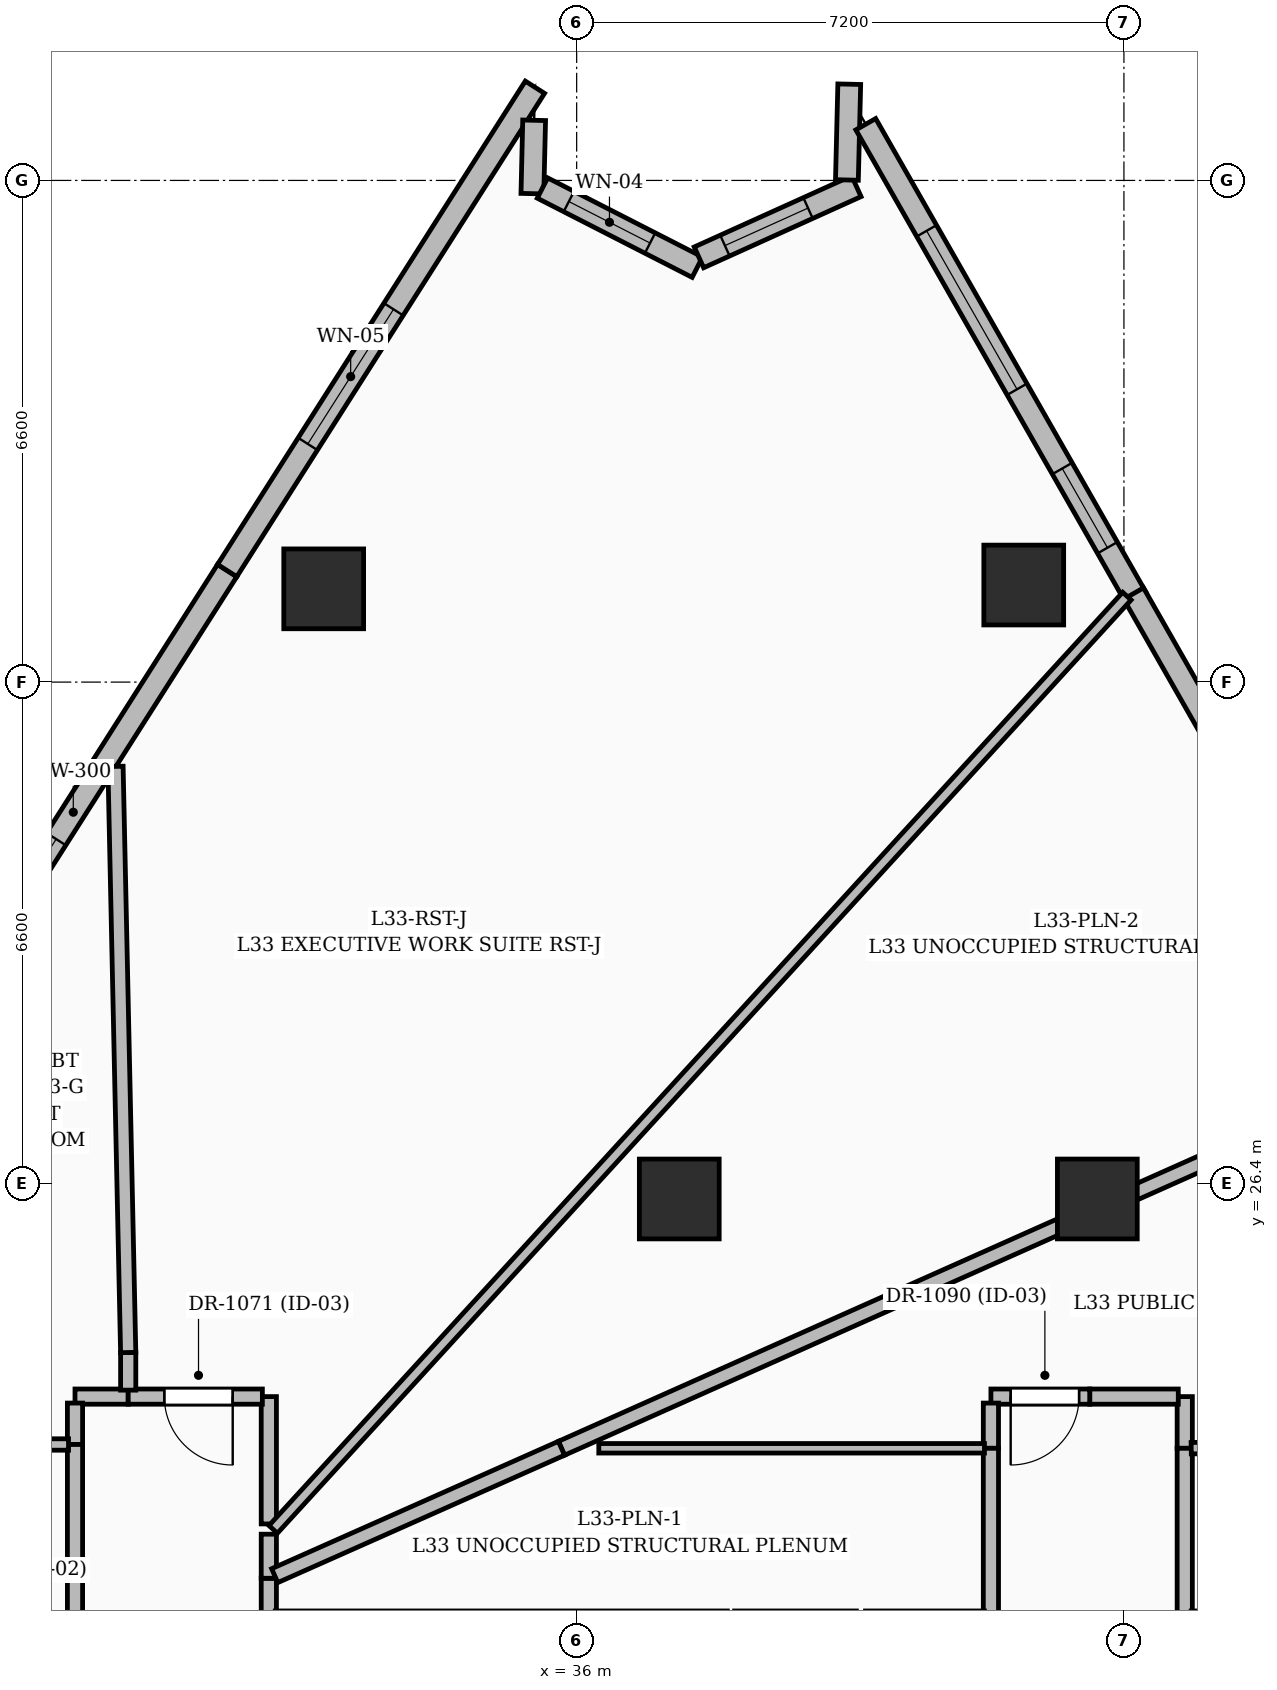
"""IFC4 building model, lengths in metres.
Left out: names, types, materials, properties, quantities, classifications, styles, units other than length and angle.
Written with IfcOpenShell. Run it as: python <this file> out.ifc"""

import sys

from ifc_helpers import new_model, si_unit, direction, frame, frame_2d, origin, origin_2d, place, context, subcontext, project, spatial, rectangle, extrude, element, fill, save


model = new_model("IFC4")
c1 = context("Model", 3, precision=1e-05, world=origin(), true_north=direction((0.0, 1.0)))
c2 = subcontext(c1, "Body", "Model", "MODEL_VIEW")
j1 = project(units=[si_unit("LENGTHUNIT", "METRE"), si_unit("PLANEANGLEUNIT", "RADIAN")], contexts=[c1])
p1 = place(None, origin())
s1 = spatial("IfcSite", under=j1, at=p1, CompositionType="ELEMENT")
p2 = place(p1, origin())
s2 = spatial("IfcBuilding", under=s1, at=p2, CompositionType="ELEMENT")
p3 = place(p2, frame((0.0, 0.0, 132.0)))
s3 = spatial("IfcBuildingStorey", under=s2, at=p3, CompositionType="ELEMENT", Elevation=132.0)
for number, where, z_axis, x_axis in (
    (1, (42.85, 26.2, 0.0), (0.0, 0.0, 1.0), (1.0, 0.0, 0.0)),
    (2, (37.35, 26.2, 0.0), (0.0, 0.0, 1.0), (1.0, 0.0, 0.0)),
    (3, (41.882, 34.277, 0.0), (0.0, 0.0, 1.0), (1.0, 0.0, 0.0)),
    (4, (32.672, 34.227, 0.0), (0.0, 0.0, 1.0), (1.0, 0.0, 0.0)),
):
    element("IfcColumn", number, at=place(p3, frame(where, z_axis=z_axis, x_axis=x_axis)), inside=s3, PredefinedType="COLUMN", context=c2, shape_type="SweptSolid", body=[
        extrude(rectangle(XDim=1.05, YDim=1.05, at=origin_2d()), origin(), (0.0, 0.0, 1.0), 3.6),
    ])
p4 = place(p3, frame((27.353, 28.109, 0.0), z_axis=(0.0, 0.0, 1.0), x_axis=(0.537126938509, 0.843501423785, 0.0)))
e5 = element("IfcWall", 5, at=p4, inside=s3, PredefinedType="SOLIDWALL", context=c2, shape_type="SweptSolid", body=[
    extrude(rectangle(XDim=7.538, YDim=0.3, at=frame_2d((3.769, 0.0))), origin(), (0.0, 0.0, 1.0), 3.35),
])
p5 = place(p4, frame((0.95, 0.0, 0.6)))
e6 = element("IfcOpeningElement", 6, at=p5, cuts=e5, PredefinedType="OPENING", context=c2, shape_type="SweptSolid", body=[
    extrude(rectangle(XDim=2.4, YDim=2.1, at=frame_2d((1.2, 1.05))), frame((0.0, 0.16, 0.0), z_axis=(0.0, -1.0, 0.0), x_axis=(1.0, 0.0, 0.0)), (0.0, 0.0, 1.0), 0.32),
])
p6 = place(p3, frame((31.402, 34.467, 0.0), z_axis=(0.0, 0.0, 1.0), x_axis=(0.537103895222, 0.843516096905, 0.0)))
e7 = element("IfcWall", 7, at=p6, inside=s3, PredefinedType="SOLIDWALL", context=c2, shape_type="SweptSolid", body=[
    extrude(rectangle(XDim=7.538, YDim=0.3, at=frame_2d((3.769, 0.0))), origin(), (0.0, 0.0, 1.0), 3.35),
])
p7 = place(p6, frame((1.975, 0.0, 0.55)))
e8 = element("IfcOpeningElement", 8, at=p7, cuts=e7, PredefinedType="OPENING", context=c2, shape_type="SweptSolid", body=[
    extrude(rectangle(XDim=2.1, YDim=2.4, at=frame_2d((1.05, 1.2))), frame((0.0, 0.16, 0.0), z_axis=(0.0, -1.0, 0.0), x_axis=(1.0, 0.0, 0.0)), (0.0, 0.0, 1.0), 0.32),
])
p8 = place(p3, frame((35.441, 40.391, 0.0), z_axis=(0.0, 0.0, 1.0), x_axis=(-0.023772687739, -0.999717389725, 0.0)))
e9 = element("IfcWall", 9, at=p8, inside=s3, PredefinedType="SOLIDWALL", context=c2, shape_type="SweptSolid", body=[
    extrude(rectangle(XDim=0.965, YDim=0.3, at=frame_2d((0.483, 0.0))), origin(), (0.0, 0.0, 1.0), 3.35),
])
p9 = place(p3, frame((35.55, 39.5, 0.0), z_axis=(0.0, 0.0, 1.0), x_axis=(0.890379913817, -0.455218199408, 0.0)))
e10 = element("IfcWall", 10, at=p9, inside=s3, PredefinedType="SOLIDWALL", context=c2, shape_type="SweptSolid", body=[
    extrude(rectangle(XDim=2.289, YDim=0.3, at=frame_2d((1.144, 0.0))), origin(), (0.0, 0.0, 1.0), 3.35),
])
p10 = place(p9, frame((0.39, 0.0, 0.8)))
e11 = element("IfcOpeningElement", 11, at=p10, cuts=e10, PredefinedType="OPENING", context=c2, shape_type="SweptSolid", body=[
    extrude(rectangle(XDim=1.2, YDim=1.8, at=frame_2d((0.6, 0.9))), frame((0.0, 0.16, 0.0), z_axis=(0.0, -1.0, 0.0), x_axis=(1.0, 0.0, 0.0)), (0.0, 0.0, 1.0), 0.32),
])
p11 = place(p3, frame((37.609, 38.588, 0.0), z_axis=(0.0, 0.0, 1.0), x_axis=(0.911273073729, 0.411802604528, 0.0)))
e12 = element("IfcWall", 12, at=p11, inside=s3, PredefinedType="SOLIDWALL", context=c2, shape_type="SweptSolid", body=[
    extrude(rectangle(XDim=2.272, YDim=0.3, at=frame_2d((1.136, 0.0))), origin(), (0.0, 0.0, 1.0), 3.35),
])
p12 = place(p11, frame((0.375, 0.0, 0.8)))
e13 = element("IfcOpeningElement", 13, at=p12, cuts=e12, PredefinedType="OPENING", context=c2, shape_type="SweptSolid", body=[
    extrude(rectangle(XDim=1.2, YDim=1.8, at=frame_2d((0.6, 0.9))), frame((0.0, 0.16, 0.0), z_axis=(0.0, -1.0, 0.0), x_axis=(1.0, 0.0, 0.0)), (0.0, 0.0, 1.0), 0.32),
])
p13 = place(p3, frame((39.555, 39.606, 0.0), z_axis=(0.0, 0.0, 1.0), x_axis=(0.024600187161, 0.999697369603, 0.0)))
e14 = element("IfcWall", 14, at=p13, inside=s3, PredefinedType="SOLIDWALL", context=c2, shape_type="SweptSolid", body=[
    extrude(rectangle(XDim=1.26, YDim=0.3, at=frame_2d((0.63, 0.0))), origin(), (0.0, 0.0, 1.0), 3.35),
])
p14 = place(p3, frame((39.804, 40.34, 0.0), z_axis=(0.0, 0.0, 1.0), x_axis=(0.495644320378, -0.86852559414, 0.0)))
e15 = element("IfcWall", 15, at=p14, inside=s3, PredefinedType="SOLIDWALL", context=c2, shape_type="SweptSolid", body=[
    extrude(rectangle(XDim=7.177, YDim=0.3, at=frame_2d((3.589, 0.0))), origin(), (0.0, 0.0, 1.0), 3.35),
])
p15 = place(p14, frame((5.215, 0.0, 0.8)))
e16 = element("IfcOpeningElement", 16, at=p15, cuts=e15, PredefinedType="OPENING", context=c2, shape_type="SweptSolid", body=[
    extrude(rectangle(XDim=1.2, YDim=1.8, at=frame_2d((0.6, 0.9))), frame((0.0, 0.16, 0.0), z_axis=(0.0, -1.0, 0.0), x_axis=(1.0, 0.0, 0.0)), (0.0, 0.0, 1.0), 0.32),
])
p16 = place(p14, frame((1.615, 0.0, 0.6)))
e17 = element("IfcOpeningElement", 17, at=p16, cuts=e15, PredefinedType="OPENING", context=c2, shape_type="SweptSolid", body=[
    extrude(rectangle(XDim=2.4, YDim=2.1, at=frame_2d((1.2, 1.05))), frame((0.0, 0.16, 0.0), z_axis=(0.0, -1.0, 0.0), x_axis=(1.0, 0.0, 0.0)), (0.0, 0.0, 1.0), 0.32),
])
p17 = place(p3, frame((43.327, 34.165, 0.0), z_axis=(0.0, 0.0, 1.0), x_axis=(0.495665411197, -0.868513557835, 0.0)))
e18 = element("IfcWall", 18, at=p17, inside=s3, PredefinedType="SOLIDWALL", context=c2, shape_type="SweptSolid", body=[
    extrude(rectangle(XDim=7.83, YDim=0.3, at=frame_2d((3.915, 0.0))), origin(), (0.0, 0.0, 1.0), 3.35),
])
p18 = place(p17, frame((2.668, 0.0, 0.55)))
e19 = element("IfcOpeningElement", 19, at=p18, cuts=e18, PredefinedType="OPENING", context=c2, shape_type="SweptSolid", body=[
    extrude(rectangle(XDim=2.1, YDim=2.4, at=frame_2d((1.05, 1.2))), frame((0.0, 0.16, 0.0), z_axis=(0.0, -1.0, 0.0), x_axis=(1.0, 0.0, 0.0)), (0.0, 0.0, 1.0), 0.32),
])
p19 = place(p3, frame((30.1, 23.6, 0.0), z_axis=(0.0, 0.0, 1.0), x_axis=(-1.0, 0.0, 0.0)))
e20 = element("IfcWall", 20, at=p19, inside=s3, PredefinedType="PARTITIONING", context=c2, shape_type="SweptSolid", body=[
    extrude(rectangle(XDim=0.7, YDim=0.2, at=frame_2d((0.35, 0.0))), origin(), (0.0, 0.0, 1.0), 2.372),
])
p20 = place(p3, frame((29.4, 23.515, 0.0), z_axis=(0.0, 0.0, 1.0), x_axis=(0.0, -1.0, 0.0)))
e21 = element("IfcWall", 21, at=p20, inside=s3, PredefinedType="PARTITIONING", context=c2, shape_type="SweptSolid", body=[
    extrude(rectangle(XDim=0.545, YDim=0.2, at=frame_2d((0.272, 0.0))), origin(), (0.0, 0.0, 1.0), 2.372),
])
p21 = place(p3, frame((29.4, 22.97, 0.0), z_axis=(0.0, 0.0, 1.0), x_axis=(0.0, -1.0, 0.0)))
e22 = element("IfcWall", 22, at=p21, inside=s3, PredefinedType="PARTITIONING", context=c2, shape_type="SweptSolid", body=[
    extrude(rectangle(XDim=5.22, YDim=0.2, at=frame_2d((2.61, 0.0))), origin(), (0.0, 0.0, 1.0), 3.01),
])
p22 = place(p3, frame((44.0, 22.92, 0.0), z_axis=(0.0, 0.0, 1.0), x_axis=(0.0, 1.0, 0.0)))
e23 = element("IfcWall", 23, at=p22, inside=s3, PredefinedType="PARTITIONING", context=c2, shape_type="SweptSolid", body=[
    extrude(rectangle(XDim=0.68, YDim=0.2, at=frame_2d((0.34, 0.0))), origin(), (0.0, 0.0, 1.0), 2.436),
])
p23 = place(p3, frame((43.915, 23.6, 0.0), z_axis=(0.0, 0.0, 1.0), x_axis=(-1.0, 0.0, 0.0)))
e24 = element("IfcWall", 24, at=p23, inside=s3, PredefinedType="PARTITIONING", context=c2, shape_type="SweptSolid", body=[
    extrude(rectangle(XDim=1.165, YDim=0.2, at=frame_2d((0.583, 0.0))), origin(), (0.0, 0.0, 1.0), 2.436),
])
p24 = place(p3, frame((42.75, 23.6, 0.0), z_axis=(0.0, 0.0, 1.0), x_axis=(-1.0, 0.0, 0.0)))
e25 = element("IfcWall", 25, at=p24, inside=s3, PredefinedType="PARTITIONING", context=c2, shape_type="SweptSolid", body=[
    extrude(rectangle(XDim=1.3, YDim=0.2, at=frame_2d((0.65, 0.0))), origin(), (0.0, 0.0, 1.0), 3.35),
])
p25 = place(p24, frame((0.14, 0.0, 0.0)))
e26 = element("IfcOpeningElement", 26, at=p25, cuts=e25, PredefinedType="OPENING", context=c2, shape_type="SweptSolid", body=[
    extrude(rectangle(XDim=0.9, YDim=2.1, at=frame_2d((0.45, 1.05))), frame((0.0, 0.11, 0.0), z_axis=(0.0, -1.0, 0.0), x_axis=(1.0, 0.0, 0.0)), (0.0, 0.0, 1.0), 0.22),
])
p26 = place(p3, frame((41.45, 23.515, 0.0), z_axis=(0.0, 0.0, 1.0), x_axis=(0.0, -1.0, 0.0)))
e27 = element("IfcWall", 27, at=p26, inside=s3, PredefinedType="PARTITIONING", context=c2, shape_type="SweptSolid", body=[
    extrude(rectangle(XDim=0.595, YDim=0.2, at=frame_2d((0.297, 0.0))), origin(), (0.0, 0.0, 1.0), 3.35),
])
p27 = place(p3, frame((44.0, 20.68, 0.0), z_axis=(0.0, 0.0, 1.0), x_axis=(0.0, 1.0, 0.0)))
e28 = element("IfcWall", 28, at=p27, inside=s3, PredefinedType="PARTITIONING", context=c2, shape_type="SweptSolid", body=[
    extrude(rectangle(XDim=2.24, YDim=0.2, at=frame_2d((1.12, 0.0))), origin(), (0.0, 0.0, 1.0), 2.436),
])
p28 = place(p3, frame((31.95, 20.68, 0.0), z_axis=(0.0, 0.0, 1.0), x_axis=(0.0, 1.0, 0.0)))
e29 = element("IfcWall", 29, at=p28, inside=s3, PredefinedType="PARTITIONING", context=c2, shape_type="SweptSolid", body=[
    extrude(rectangle(XDim=0.53, YDim=0.2, at=frame_2d((0.265, 0.0))), origin(), (0.0, 0.0, 1.0), 2.372),
])
p29 = place(p3, frame((41.45, 22.92, 0.0), z_axis=(0.0, 0.0, 1.0), x_axis=(0.0, -1.0, 0.0)))
e30 = element("IfcWall", 30, at=p29, inside=s3, PredefinedType="PARTITIONING", context=c2, shape_type="SweptSolid", body=[
    extrude(rectangle(XDim=2.24, YDim=0.2, at=frame_2d((1.12, 0.0))), origin(), (0.0, 0.0, 1.0), 3.35),
])
p30 = place(p3, frame((31.95, 21.925, 0.0), z_axis=(0.0, 0.0, 1.0), x_axis=(0.0, 1.0, 0.0)))
e31 = element("IfcWall", 31, at=p30, inside=s3, PredefinedType="PARTITIONING", context=c2, shape_type="SweptSolid", body=[
    extrude(rectangle(XDim=1.675, YDim=0.2, at=frame_2d((0.837, 0.0))), origin(), (0.0, 0.0, 1.0), 3.35),
])
p31 = place(p3, frame((31.865, 23.6, 0.0), z_axis=(0.0, 0.0, 1.0), x_axis=(-1.0, 0.0, 0.0)))
e32 = element("IfcWall", 32, at=p31, inside=s3, PredefinedType="PARTITIONING", context=c2, shape_type="SweptSolid", body=[
    extrude(rectangle(XDim=1.765, YDim=0.2, at=frame_2d((0.882, 0.0))), origin(), (0.0, 0.0, 1.0), 3.01),
])
p32 = place(p31, frame((0.39, 0.0, 0.0)))
e33 = element("IfcOpeningElement", 33, at=p32, cuts=e32, PredefinedType="OPENING", context=c2, shape_type="SweptSolid", body=[
    extrude(rectangle(XDim=0.9, YDim=2.1, at=frame_2d((0.45, 1.05))), frame((0.0, 0.11, 0.0), z_axis=(0.0, -1.0, 0.0), x_axis=(1.0, 0.0, 0.0)), (0.0, 0.0, 1.0), 0.22),
])
p33 = place(p3, frame((31.95, 21.21, 0.0), z_axis=(0.0, 0.0, 1.0), x_axis=(0.0, 1.0, 0.0)))
e34 = element("IfcWall", 34, at=p33, inside=s3, PredefinedType="PARTITIONING", context=c2, shape_type="SweptSolid", body=[
    extrude(rectangle(XDim=0.58, YDim=0.2, at=frame_2d((0.29, 0.0))), origin(), (0.0, 0.0, 1.0), 3.01),
])
p34 = place(p3, frame((27.232, 22.97, 0.0), z_axis=(0.0, 0.0, 1.0), x_axis=(1.0, 0.0, 0.0)))
e35 = element("IfcWall", 35, at=p34, inside=s3, PredefinedType="PARTITIONING", context=c2, shape_type="SweptSolid", body=[
    extrude(rectangle(XDim=2.083, YDim=0.15, at=frame_2d((1.041, 0.0))), origin(), (0.0, 0.0, 1.0), 3.01),
])
p35 = place(p3, frame((30.1, 23.685, 0.0), z_axis=(0.0, 0.0, 1.0), x_axis=(0.0, 1.0, 0.0)))
e36 = element("IfcWall", 36, at=p35, inside=s3, PredefinedType="PARTITIONING", context=c2, shape_type="SweptSolid", body=[
    extrude(rectangle(XDim=0.495, YDim=0.2, at=frame_2d((0.248, 0.0))), origin(), (0.0, 0.0, 1.0), 3.35),
])
p36 = place(p3, frame((30.1, 24.18, 0.0), z_axis=(0.0, 0.0, 1.0), x_axis=(-0.021650773046, 0.99976559454, 0.0)))
e37 = element("IfcWall", 37, at=p36, inside=s3, PredefinedType="PARTITIONING", context=c2, shape_type="SweptSolid", body=[
    extrude(rectangle(XDim=7.713, YDim=0.2, at=frame_2d((3.856, 0.0))), origin(), (0.0, 0.0, 1.0), 2.57),
])
p37 = place(p3, frame((44.085, 22.921, 0.0), z_axis=(0.0, 0.0, 1.0), x_axis=(0.999859312972, 0.016773618064, 0.0)))
e38 = element("IfcWall", 38, at=p37, inside=s3, PredefinedType="PARTITIONING", context=c2, shape_type="SweptSolid", body=[
    extrude(rectangle(XDim=5.473, YDim=0.15, at=frame_2d((2.736, 0.0))), origin(), (0.0, 0.0, 1.0), 2.372),
])
p38 = place(p37, frame((1.814, 0.0, 0.0)))
e39 = element("IfcOpeningElement", 39, at=p38, cuts=e38, PredefinedType="OPENING", context=c2, shape_type="SweptSolid", body=[
    extrude(rectangle(XDim=0.85, YDim=2.1, at=frame_2d((0.425, 1.05))), frame((0.0, 0.085, 0.0), z_axis=(0.0, -1.0, 0.0), x_axis=(1.0, 0.0, 0.0)), (0.0, 0.0, 1.0), 0.17),
])
p39 = place(p3, frame((36.291, 22.92, 0.0), z_axis=(0.0, 0.0, 1.0), x_axis=(1.0, 0.0, 0.0)))
e40 = element("IfcWall", 40, at=p39, inside=s3, PredefinedType="PARTITIONING", context=c2, shape_type="SweptSolid", body=[
    extrude(rectangle(XDim=5.074, YDim=0.125, at=frame_2d((2.537, 0.0))), origin(), (0.0, 0.0, 1.0), 3.35),
])
p40 = place(p3, frame((46.825, 27.835, 0.0), z_axis=(0.0, 0.0, 1.0), x_axis=(-0.913347223941, -0.407181591576, 0.0)))
e41 = element("IfcWall", 41, at=p40, inside=s3, PredefinedType="PARTITIONING", context=c2, shape_type="SweptSolid", body=[
    extrude(rectangle(XDim=12.071, YDim=0.2, at=frame_2d((6.035, 0.0))), origin(), (0.0, 0.0, 1.0), 2.57),
])
p41 = place(p3, frame((35.8, 22.92, 0.0), z_axis=(0.0, 0.0, 1.0), x_axis=(-0.913911518979, -0.405913458113, 0.0)))
e42 = element("IfcWall", 42, at=p41, inside=s3, PredefinedType="PARTITIONING", context=c2, shape_type="SweptSolid", body=[
    extrude(rectangle(XDim=4.128, YDim=0.2, at=frame_2d((2.064, 0.0))), origin(), (0.0, 0.0, 1.0), 2.436),
])
p42 = place(p3, frame((32.007, 21.853, 0.0), z_axis=(0.0, 0.0, 1.0), x_axis=(0.674958914196, 0.73785531383, 0.0)))
e43 = element("IfcWall", 43, at=p42, inside=s3, PredefinedType="PARTITIONING", context=c2, shape_type="SweptSolid", body=[
    extrude(rectangle(XDim=16.641, YDim=0.15, at=frame_2d((8.32, 0.0))), origin(), (0.0, 0.0, 1.0), 2.372),
])
p43 = place(p5, origin())
e44 = element("IfcWindow", 44, at=p43, inside=s3, PartitioningType="SINGLE_PANEL", PredefinedType="WINDOW", context=c2, shape_type="SweptSolid", body=[
    extrude(rectangle(XDim=2.4, YDim=2.1, at=frame_2d((1.2, 1.05))), frame((0.0, 0.03, 0.0), z_axis=(0.0, -1.0, 0.0), x_axis=(1.0, 0.0, 0.0)), (0.0, 0.0, 1.0), 0.06),
])
fill(e6, e44)
p44 = place(p7, origin())
e45 = element("IfcWindow", 45, at=p44, inside=s3, PartitioningType="SINGLE_PANEL", PredefinedType="WINDOW", context=c2, shape_type="SweptSolid", body=[
    extrude(rectangle(XDim=2.1, YDim=2.4, at=frame_2d((1.05, 1.2))), frame((0.0, 0.03, 0.0), z_axis=(0.0, -1.0, 0.0), x_axis=(1.0, 0.0, 0.0)), (0.0, 0.0, 1.0), 0.06),
])
fill(e8, e45)
p45 = place(p10, origin())
e46 = element("IfcWindow", 46, at=p45, inside=s3, PartitioningType="SINGLE_PANEL", PredefinedType="WINDOW", context=c2, shape_type="SweptSolid", body=[
    extrude(rectangle(XDim=1.2, YDim=1.8, at=frame_2d((0.6, 0.9))), frame((0.0, 0.03, 0.0), z_axis=(0.0, -1.0, 0.0), x_axis=(1.0, 0.0, 0.0)), (0.0, 0.0, 1.0), 0.06),
])
fill(e11, e46)
p46 = place(p12, origin())
e47 = element("IfcWindow", 47, at=p46, inside=s3, PartitioningType="SINGLE_PANEL", PredefinedType="WINDOW", context=c2, shape_type="SweptSolid", body=[
    extrude(rectangle(XDim=1.2, YDim=1.8, at=frame_2d((0.6, 0.9))), frame((0.0, 0.03, 0.0), z_axis=(0.0, -1.0, 0.0), x_axis=(1.0, 0.0, 0.0)), (0.0, 0.0, 1.0), 0.06),
])
fill(e13, e47)
p47 = place(p15, origin())
e48 = element("IfcWindow", 48, at=p47, inside=s3, PartitioningType="SINGLE_PANEL", PredefinedType="WINDOW", context=c2, shape_type="SweptSolid", body=[
    extrude(rectangle(XDim=1.2, YDim=1.8, at=frame_2d((0.6, 0.9))), frame((0.0, 0.03, 0.0), z_axis=(0.0, -1.0, 0.0), x_axis=(1.0, 0.0, 0.0)), (0.0, 0.0, 1.0), 0.06),
])
fill(e16, e48)
p48 = place(p16, origin())
e49 = element("IfcWindow", 49, at=p48, inside=s3, PartitioningType="SINGLE_PANEL", PredefinedType="WINDOW", context=c2, shape_type="SweptSolid", body=[
    extrude(rectangle(XDim=2.4, YDim=2.1, at=frame_2d((1.2, 1.05))), frame((0.0, 0.03, 0.0), z_axis=(0.0, -1.0, 0.0), x_axis=(1.0, 0.0, 0.0)), (0.0, 0.0, 1.0), 0.06),
])
fill(e17, e49)
p49 = place(p32, origin())
e50 = element("IfcDoor", 50, at=p49, inside=s3, OperationType="SINGLE_SWING_LEFT", PredefinedType="DOOR", context=c2, shape_type="SweptSolid", body=[
    extrude(rectangle(XDim=0.9, YDim=2.1, at=frame_2d((0.45, 1.05))), frame((0.0, 0.025, 0.0), z_axis=(0.0, -1.0, 0.0), x_axis=(1.0, 0.0, 0.0)), (0.0, 0.0, 1.0), 0.05),
])
fill(e33, e50)
p50 = place(p25, origin())
e51 = element("IfcDoor", 51, at=p50, inside=s3, OperationType="SINGLE_SWING_RIGHT", PredefinedType="DOOR", context=c2, shape_type="SweptSolid", body=[
    extrude(rectangle(XDim=0.9, YDim=2.1, at=frame_2d((0.45, 1.05))), frame((0.0, 0.025, 0.0), z_axis=(0.0, -1.0, 0.0), x_axis=(1.0, 0.0, 0.0)), (0.0, 0.0, 1.0), 0.05),
])
fill(e26, e51)
save(model, sys.argv[1])
